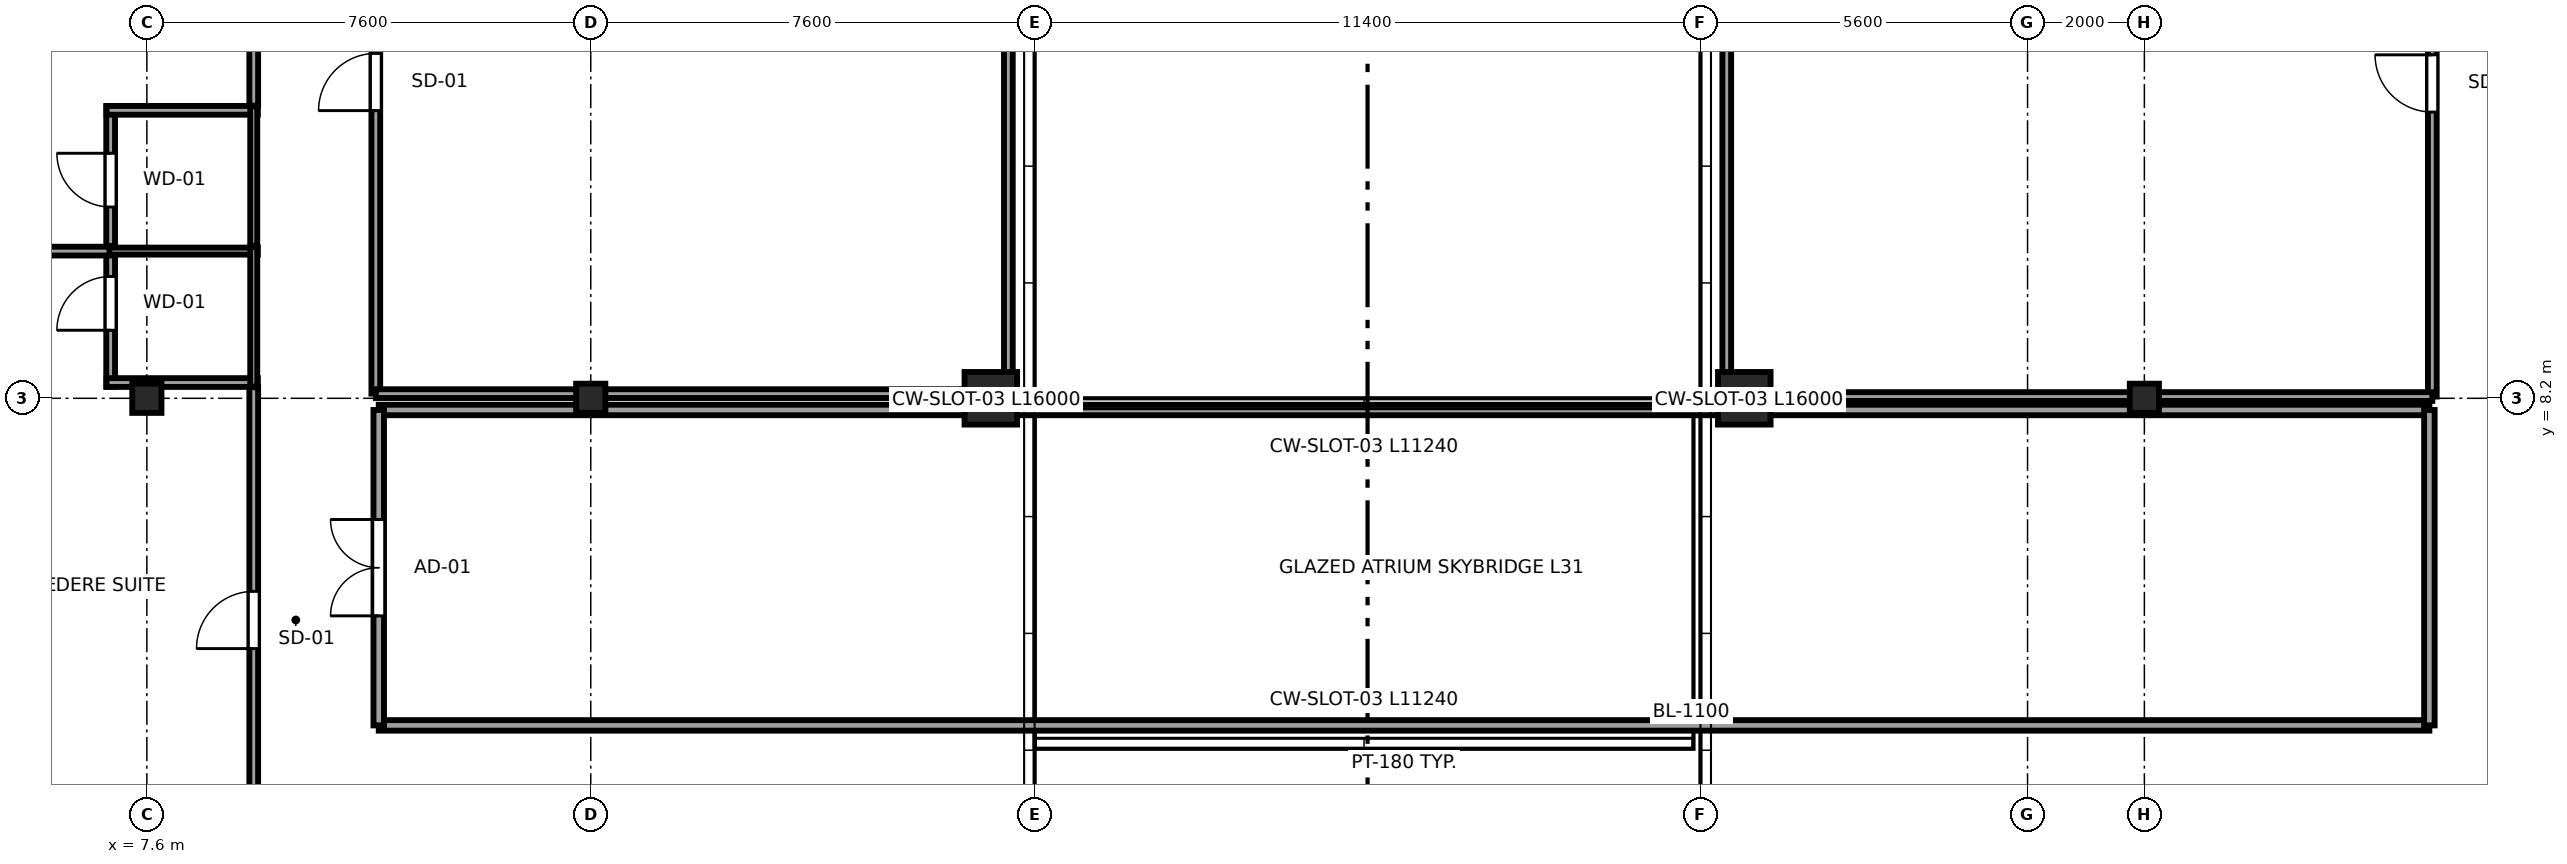
"""IFC4 building model, lengths in metres.
Left out: names, types, materials, properties, quantities, classifications, styles, units other than length and angle.
Written with IfcOpenShell. Run it as: python <this file> out.ifc"""

import sys

from ifc_helpers import new_model, si_unit, direction, frame, frame_2d, origin, origin_2d, place, context, subcontext, project, spatial, rectangle, i_section, extrude, source, transform, mapped, element, fill, save


model = new_model("IFC4")
c1 = context("Model", 3, precision=1e-05, world=origin(), true_north=direction((0.0, 1.0)))
c2 = subcontext(c1, "Body", "Model", "MODEL_VIEW")
j1 = project(units=[si_unit("LENGTHUNIT", "METRE"), si_unit("PLANEANGLEUNIT", "RADIAN")], contexts=[c1])
p1 = place(None, origin())
s1 = spatial("IfcSite", under=j1, at=p1, CompositionType="ELEMENT")
p2 = place(p1, origin())
s2 = spatial("IfcBuilding", under=s1, at=p2, CompositionType="ELEMENT")
p3 = place(p2, frame((0.0, 0.0, 122.2)))
s3 = spatial("IfcBuildingStorey", under=s2, at=p3, CompositionType="ELEMENT", Elevation=122.2)
m1 = source(origin(), c2, "Body", "SweptSolid", [
    extrude(i_section(OverallWidth=0.5, OverallDepth=0.5, WebThickness=0.022, FlangeThickness=0.034, at=origin_2d()), origin(), (0.0, 0.0, 1.0), 3.55),
])
for number, where, z_axis, x_axis in (
    (1, (7.6, 8.2, 0.0), (0.0, 0.0, 1.0), (1.0, 0.0, 0.0)),
    (2, (15.2, 8.2, 0.0), (0.0, 0.0, 1.0), (1.0, 0.0, 0.0)),
):
    element("IfcColumn", number, at=place(p3, frame(where, z_axis=z_axis, x_axis=x_axis)), inside=s3, PredefinedType="COLUMN", context=c2, shape_type="MappedRepresentation", body=[
        mapped(m1, transform((0.0, 0.0, 0.0), x_axis=(1.0, 0.0, 0.0), y_axis=(0.0, 1.0, 0.0), z_axis=(0.0, 0.0, 1.0), scale=1.0)),
    ])
m2 = source(origin(), c2, "Body", "SweptSolid", [
    extrude(rectangle(XDim=0.9, YDim=0.9, at=origin_2d()), origin(), (0.0, 0.0, 1.0), 3.55),
])
for number, where, z_axis, x_axis in (
    (3, (22.05, 8.2, 0.0), (0.0, 0.0, 1.0), (1.0, 0.0, 0.0)),
    (4, (34.95, 8.2, 0.0), (0.0, 0.0, 1.0), (1.0, 0.0, 0.0)),
):
    element("IfcColumn", number, at=place(p3, frame(where, z_axis=z_axis, x_axis=x_axis)), inside=s3, PredefinedType="COLUMN", context=c2, shape_type="MappedRepresentation", body=[
        mapped(m2, transform((0.0, 0.0, 0.0), x_axis=(1.0, 0.0, 0.0), y_axis=(0.0, 1.0, 0.0), z_axis=(0.0, 0.0, 1.0), scale=1.0)),
    ])
p4 = place(p3, frame((41.8, 8.2, 0.0), z_axis=(0.0, 0.0, 1.0), x_axis=(1.0, 0.0, 0.0)))
e5 = element("IfcColumn", 5, at=p4, inside=s3, PredefinedType="COLUMN", context=c2, shape_type="MappedRepresentation", body=[
    mapped(m1, transform((0.0, 0.0, 0.0), x_axis=(1.0, 0.0, 0.0), y_axis=(0.0, 1.0, 0.0), z_axis=(0.0, 0.0, 1.0), scale=1.0)),
])
p5 = place(p3, frame((6.98, 8.4, 0.0), z_axis=(0.0, 0.0, 1.0), x_axis=(0.0, 1.0, 0.0)))
e6 = element("IfcWall", 6, at=p5, inside=s3, PredefinedType="PARTITIONING", context=c2, shape_type="SweptSolid", body=[
    extrude(rectangle(XDim=2.39, YDim=0.15, at=frame_2d((1.195, 0.0))), origin(), (0.0, 0.0, 1.0), 3.37),
])
p6 = place(p5, frame((0.965, 0.0, 0.0)))
e7 = element("IfcOpeningElement", 7, at=p6, cuts=e6, PredefinedType="OPENING", context=c2, shape_type="SweptSolid", body=[
    extrude(rectangle(XDim=0.92, YDim=2.01, at=frame_2d((0.46, 1.005))), frame((0.0, 0.085, 0.0), z_axis=(0.0, -1.0, 0.0), x_axis=(1.0, 0.0, 0.0)), (0.0, 0.0, 1.0), 0.17),
])
p7 = place(p3, frame((6.91, 8.47, 0.0), z_axis=(0.0, 0.0, 1.0), x_axis=(1.0, 0.0, 0.0)))
e8 = element("IfcWall", 8, at=p7, inside=s3, PredefinedType="PARTITIONING", context=c2, shape_type="SweptSolid", body=[
    extrude(rectangle(XDim=2.59, YDim=0.15, at=frame_2d((1.295, 0.0))), origin(), (0.0, 0.0, 1.0), 3.37),
])
p8 = place(p3, frame((6.91, 10.72, 0.0), z_axis=(0.0, 0.0, 1.0), x_axis=(1.0, 0.0, 0.0)))
e9 = element("IfcWall", 9, at=p8, inside=s3, PredefinedType="PLUMBINGWALL", context=c2, shape_type="SweptSolid", body=[
    extrude(rectangle(XDim=2.59, YDim=0.12, at=frame_2d((1.295, 0.0))), origin(), (0.0, 0.0, 1.0), 3.37),
])
p9 = place(p3, frame((9.43, 8.4, 0.0), z_axis=(0.0, 0.0, 1.0), x_axis=(0.0, 1.0, 0.0)))
e10 = element("IfcWall", 10, at=p9, inside=s3, PredefinedType="PLUMBINGWALL", context=c2, shape_type="SweptSolid", body=[
    extrude(rectangle(XDim=2.39, YDim=0.12, at=frame_2d((1.195, 0.0))), origin(), (0.0, 0.0, 1.0), 3.37),
])
p10 = place(p3, frame((6.98, 10.81, 0.0), z_axis=(0.0, 0.0, 1.0), x_axis=(0.0, 1.0, 0.0)))
e11 = element("IfcWall", 11, at=p10, inside=s3, PredefinedType="PARTITIONING", context=c2, shape_type="SweptSolid", body=[
    extrude(rectangle(XDim=2.39, YDim=0.15, at=frame_2d((1.195, 0.0))), origin(), (0.0, 0.0, 1.0), 3.37),
])
p11 = place(p10, frame((0.665, 0.0, 0.0)))
e12 = element("IfcOpeningElement", 12, at=p11, cuts=e11, PredefinedType="OPENING", context=c2, shape_type="SweptSolid", body=[
    extrude(rectangle(XDim=0.92, YDim=2.01, at=frame_2d((0.46, 1.005))), frame((0.0, 0.085, 0.0), z_axis=(0.0, -1.0, 0.0), x_axis=(1.0, 0.0, 0.0)), (0.0, 0.0, 1.0), 0.17),
])
p12 = place(p3, frame((6.91, 13.13, 0.0), z_axis=(0.0, 0.0, 1.0), x_axis=(1.0, 0.0, 0.0)))
e13 = element("IfcWall", 13, at=p12, inside=s3, PredefinedType="PARTITIONING", context=c2, shape_type="SweptSolid", body=[
    extrude(rectangle(XDim=2.59, YDim=0.15, at=frame_2d((1.295, 0.0))), origin(), (0.0, 0.0, 1.0), 3.37),
])
p13 = place(p3, frame((9.43, 10.81, 0.0), z_axis=(0.0, 0.0, 1.0), x_axis=(0.0, 1.0, 0.0)))
e14 = element("IfcWall", 14, at=p13, inside=s3, PredefinedType="PLUMBINGWALL", context=c2, shape_type="SweptSolid", body=[
    extrude(rectangle(XDim=2.39, YDim=0.12, at=frame_2d((1.195, 0.0))), origin(), (0.0, 0.0, 1.0), 3.37),
])
p14 = place(p3, frame((9.43, 0.405, 0.0), z_axis=(0.0, 0.0, 1.0), x_axis=(0.0, 1.0, 0.0)))
e15 = element("IfcWall", 15, at=p14, inside=s3, PredefinedType="PARTITIONING", context=c2, shape_type="SweptSolid", body=[
    extrude(rectangle(XDim=7.985, YDim=0.15, at=frame_2d((3.992, 0.0))), origin(), (0.0, 0.0, 1.0), 3.37),
])
p15 = place(p14, frame((3.51, 0.0, 0.0)))
e16 = element("IfcOpeningElement", 16, at=p15, cuts=e15, PredefinedType="OPENING", context=c2, shape_type="SweptSolid", body=[
    extrude(rectangle(XDim=0.98, YDim=2.12, at=frame_2d((0.49, 1.06))), frame((0.0, 0.085, 0.0), z_axis=(0.0, -1.0, 0.0), x_axis=(1.0, 0.0, 0.0)), (0.0, 0.0, 1.0), 0.17),
])
p16 = place(p3, frame((0.405, 10.72, 0.0), z_axis=(0.0, 0.0, 1.0), x_axis=(1.0, 0.0, 0.0)))
e17 = element("IfcWall", 17, at=p16, inside=s3, PredefinedType="PARTITIONING", context=c2, shape_type="SweptSolid", body=[
    extrude(rectangle(XDim=6.555, YDim=0.15, at=frame_2d((3.277, 0.0))), origin(), (0.0, 0.0, 1.0), 3.37),
])
p17 = place(p3, frame((9.43, 13.21, 0.0), z_axis=(0.0, 0.0, 1.0), x_axis=(0.0, 1.0, 0.0)))
e18 = element("IfcWall", 18, at=p17, inside=s3, PredefinedType="PARTITIONING", context=c2, shape_type="SweptSolid", body=[
    extrude(rectangle(XDim=8.11, YDim=0.15, at=frame_2d((4.055, 0.0))), origin(), (0.0, 0.0, 1.0), 3.37),
])
p18 = place(p17, frame((3.545, 0.0, 0.0)))
e19 = element("IfcOpeningElement", 19, at=p18, cuts=e18, PredefinedType="OPENING", context=c2, shape_type="SweptSolid", body=[
    extrude(rectangle(XDim=0.98, YDim=2.12, at=frame_2d((0.49, 1.06))), frame((0.0, 0.085, 0.0), z_axis=(0.0, -1.0, 0.0), x_axis=(1.0, 0.0, 0.0)), (0.0, 0.0, 1.0), 0.17),
])
p19 = place(p3, frame((11.52, 8.28, 0.0), z_axis=(0.0, 0.0, 1.0), x_axis=(0.0, 1.0, 0.0)))
e20 = element("IfcWall", 20, at=p19, inside=s3, PredefinedType="PARTITIONING", context=c2, shape_type="SweptSolid", body=[
    extrude(rectangle(XDim=10.71, YDim=0.15, at=frame_2d((5.355, 0.0))), origin(), (0.0, 0.0, 1.0), 2.954),
])
p20 = place(p19, frame((4.845, 0.0, 0.0)))
e21 = element("IfcOpeningElement", 21, at=p20, cuts=e20, PredefinedType="OPENING", context=c2, shape_type="SweptSolid", body=[
    extrude(rectangle(XDim=0.98, YDim=2.12, at=frame_2d((0.49, 1.06))), frame((0.0, 0.085, 0.0), z_axis=(0.0, -1.0, 0.0), x_axis=(1.0, 0.0, 0.0)), (0.0, 0.0, 1.0), 0.17),
])
p21 = place(p3, frame((11.52, 8.28, 0.0), z_axis=(0.0, 0.0, 1.0), x_axis=(1.0, 0.0, 0.0)))
e22 = element("IfcWall", 22, at=p21, inside=s3, PredefinedType="PARTITIONING", context=c2, shape_type="SweptSolid", body=[
    extrude(rectangle(XDim=10.83, YDim=0.15, at=frame_2d((5.415, 0.0))), origin(), (0.0, 0.0, 1.0), 2.748),
])
p22 = place(p3, frame((22.35, 8.28, 0.0), z_axis=(0.0, 0.0, 1.0), x_axis=(0.0, 1.0, 0.0)))
e23 = element("IfcWall", 23, at=p22, inside=s3, PredefinedType="PARTITIONING", context=c2, shape_type="SweptSolid", body=[
    extrude(rectangle(XDim=13.04, YDim=0.15, at=frame_2d((6.52, 0.0))), origin(), (0.0, 0.0, 1.0), 3.37),
])
p23 = place(p3, frame((46.73, 8.23, 0.0), z_axis=(0.0, 0.0, 1.0), x_axis=(0.0, 1.0, 0.0)))
e24 = element("IfcWall", 24, at=p23, inside=s3, PredefinedType="PARTITIONING", context=c2, shape_type="SweptSolid", body=[
    extrude(rectangle(XDim=10.76, YDim=0.15, at=frame_2d((5.38, 0.0))), origin(), (0.0, 0.0, 1.0), 3.37),
])
p24 = place(p23, frame((4.87, 0.0, 0.0)))
e25 = element("IfcOpeningElement", 25, at=p24, cuts=e24, PredefinedType="OPENING", context=c2, shape_type="SweptSolid", body=[
    extrude(rectangle(XDim=0.98, YDim=2.12, at=frame_2d((0.49, 1.06))), frame((0.0, 0.085, 0.0), z_axis=(0.0, -1.0, 0.0), x_axis=(1.0, 0.0, 0.0)), (0.0, 0.0, 1.0), 0.17),
])
p25 = place(p3, frame((34.65, 8.23, 0.0), z_axis=(0.0, 0.0, 1.0), x_axis=(1.0, 0.0, 0.0)))
e26 = element("IfcWall", 26, at=p25, inside=s3, PredefinedType="PARTITIONING", context=c2, shape_type="SweptSolid", body=[
    extrude(rectangle(XDim=12.08, YDim=0.15, at=frame_2d((6.04, 0.0))), origin(), (0.0, 0.0, 1.0), 2.748),
])
p26 = place(p3, frame((34.65, 8.23, 0.0), z_axis=(0.0, 0.0, 1.0), x_axis=(0.0, 1.0, 0.0)))
e27 = element("IfcWall", 27, at=p26, inside=s3, PredefinedType="PARTITIONING", context=c2, shape_type="SweptSolid", body=[
    extrude(rectangle(XDim=13.09, YDim=0.15, at=frame_2d((6.545, 0.0))), origin(), (0.0, 0.0, 1.0), 3.37),
])
for number, where, z_axis, x_axis in (
    (28, (11.57, 2.6, 0.0), (0.0, 0.0, 1.0), (1.0, 0.0, 0.0)),
    (29, (11.57, 8.0, 0.0), (0.0, 0.0, 1.0), (1.0, 0.0, 0.0)),
):
    element("IfcWall", number, at=place(p3, frame(where, z_axis=z_axis, x_axis=x_axis)), inside=s3, PredefinedType="PARTITIONING", context=c2, shape_type="SweptSolid", body=[
        extrude(rectangle(XDim=35.11, YDim=0.18, at=frame_2d((17.555, 0.0))), origin(), (0.0, 0.0, 1.0), 3.37),
    ])
p27 = place(p3, frame((11.57, 2.6, 0.0), z_axis=(0.0, 0.0, 1.0), x_axis=(0.0, 1.0, 0.0)))
e30 = element("IfcWall", 30, at=p27, inside=s3, PredefinedType="PARTITIONING", context=c2, shape_type="SweptSolid", body=[
    extrude(rectangle(XDim=5.4, YDim=0.18, at=frame_2d((2.7, 0.0))), origin(), (0.0, 0.0, 1.0), 3.37),
])
p28 = place(p27, frame((1.875, 0.0, 0.0)))
e31 = element("IfcOpeningElement", 31, at=p28, cuts=e30, PredefinedType="OPENING", context=c2, shape_type="SweptSolid", body=[
    extrude(rectangle(XDim=1.65, YDim=2.15, at=frame_2d((0.825, 1.075))), frame((0.0, 0.1, 0.0), z_axis=(0.0, -1.0, 0.0), x_axis=(1.0, 0.0, 0.0)), (0.0, 0.0, 1.0), 0.2),
])
p29 = place(p3, frame((46.68, 2.6, 0.0), z_axis=(0.0, 0.0, 1.0), x_axis=(0.0, 1.0, 0.0)))
e32 = element("IfcWall", 32, at=p29, inside=s3, PredefinedType="PARTITIONING", context=c2, shape_type="SweptSolid", body=[
    extrude(rectangle(XDim=5.4, YDim=0.18, at=frame_2d((2.7, 0.0))), origin(), (0.0, 0.0, 1.0), 3.37),
])
m3 = source(origin(), c2, "Body", "SweptSolid", [
    extrude(rectangle(XDim=0.92, YDim=2.01, at=frame_2d((0.46, 1.005))), frame((0.0, 0.025, 0.0), z_axis=(0.0, -1.0, 0.0), x_axis=(1.0, 0.0, 0.0)), (0.0, 0.0, 1.0), 0.05),
])
p30 = place(p6, origin())
e33 = element("IfcDoor", 33, at=p30, inside=s3, OperationType="SINGLE_SWING_LEFT", PredefinedType="DOOR", context=c2, shape_type="MappedRepresentation", body=[
    mapped(m3, transform((0.0, 0.0, 0.0), x_axis=(1.0, 0.0, 0.0), y_axis=(0.0, 1.0, 0.0), z_axis=(0.0, 0.0, 1.0), scale=1.0)),
])
fill(e7, e33)
p31 = place(p11, origin())
e34 = element("IfcDoor", 34, at=p31, inside=s3, OperationType="SINGLE_SWING_RIGHT", PredefinedType="DOOR", context=c2, shape_type="MappedRepresentation", body=[
    mapped(m3, transform((0.0, 0.0, 0.0), x_axis=(1.0, 0.0, 0.0), y_axis=(0.0, 1.0, 0.0), z_axis=(0.0, 0.0, 1.0), scale=1.0)),
])
fill(e12, e34)
m4 = source(origin(), c2, "Body", "SweptSolid", [
    extrude(rectangle(XDim=0.98, YDim=2.12, at=frame_2d((0.49, 1.06))), frame((0.0, 0.025, 0.0), z_axis=(0.0, -1.0, 0.0), x_axis=(1.0, 0.0, 0.0)), (0.0, 0.0, 1.0), 0.05),
])
p32 = place(p15, origin())
e35 = element("IfcDoor", 35, at=p32, inside=s3, OperationType="SINGLE_SWING_LEFT", PredefinedType="DOOR", context=c2, shape_type="MappedRepresentation", body=[
    mapped(m4, transform((0.0, 0.0, 0.0), x_axis=(1.0, 0.0, 0.0), y_axis=(0.0, 1.0, 0.0), z_axis=(0.0, 0.0, 1.0), scale=1.0)),
])
fill(e16, e35)
p33 = place(p20, origin())
e36 = element("IfcDoor", 36, at=p33, inside=s3, OperationType="SINGLE_SWING_LEFT", PredefinedType="DOOR", context=c2, shape_type="MappedRepresentation", body=[
    mapped(m4, transform((0.0, 0.0, 0.0), x_axis=(1.0, 0.0, 0.0), y_axis=(0.0, 1.0, 0.0), z_axis=(0.0, 0.0, 1.0), scale=1.0)),
])
fill(e21, e36)
p34 = place(p24, origin())
e37 = element("IfcDoor", 37, at=p34, inside=s3, OperationType="SINGLE_SWING_RIGHT", PredefinedType="DOOR", context=c2, shape_type="MappedRepresentation", body=[
    mapped(m4, transform((0.0, 0.0, 0.0), x_axis=(1.0, 0.0, 0.0), y_axis=(0.0, 1.0, 0.0), z_axis=(0.0, 0.0, 1.0), scale=1.0)),
])
fill(e25, e37)
m5 = source(origin(), c2, "Body", "SweptSolid", [
    extrude(rectangle(XDim=1.65, YDim=2.15, at=frame_2d((0.825, 1.075))), frame((0.0, 0.025, 0.0), z_axis=(0.0, -1.0, 0.0), x_axis=(1.0, 0.0, 0.0)), (0.0, 0.0, 1.0), 0.05),
])
p35 = place(p28, origin())
e38 = element("IfcDoor", 38, at=p35, inside=s3, OperationType="DOUBLE_DOOR_SINGLE_SWING", PredefinedType="DOOR", context=c2, shape_type="MappedRepresentation", body=[
    mapped(m5, transform((0.0, 0.0, 0.0), x_axis=(1.0, 0.0, 0.0), y_axis=(0.0, 1.0, 0.0), z_axis=(0.0, 0.0, 1.0), scale=1.0)),
])
fill(e31, e38)
save(model, sys.argv[1])
